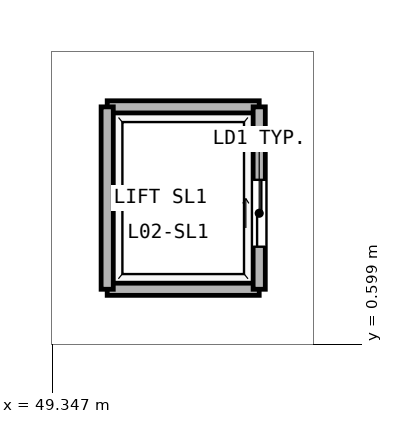
"""IFC4 building model, lengths in metres.
Left out: names, types, materials, properties, quantities, classifications, styles, units other than length and angle.
Written with IfcOpenShell. Run it as: python <this file> out.ifc"""

import sys

from ifc_helpers import new_model, si_unit, direction, frame, frame_2d, origin, place, context, subcontext, project, spatial, rectangle, extrude, element, fill, save


model = new_model("IFC4")
c1 = context("Model", 3, precision=1e-05, world=origin(), true_north=direction((0.0, 1.0)))
c2 = subcontext(c1, "Body", "Model", "MODEL_VIEW")
j1 = project(units=[si_unit("LENGTHUNIT", "METRE"), si_unit("PLANEANGLEUNIT", "RADIAN")], contexts=[c1])
p1 = place(None, origin())
s1 = spatial("IfcSite", under=j1, at=p1, CompositionType="ELEMENT")
p2 = place(p1, origin())
s2 = spatial("IfcBuilding", under=s1, at=p2, CompositionType="ELEMENT")
p3 = place(p2, frame((0.0, 0.0, 9.0)))
s3 = spatial("IfcBuildingStorey", under=s2, at=p3, CompositionType="ELEMENT", Elevation=9.0)
for number, where, z_axis, x_axis in (
    (1, (50.25, 1.5, 0.0), (0.0, 0.0, 1.0), (1.0, 0.0, 0.0)),
    (2, (50.25, 4.5, 0.0), (0.0, 0.0, 1.0), (1.0, 0.0, 0.0)),
):
    element("IfcWall", number, at=place(p3, frame(where, z_axis=z_axis, x_axis=x_axis)), inside=s3, PredefinedType="PARTITIONING", context=c2, shape_type="SweptSolid", body=[
        extrude(rectangle(XDim=2.5, YDim=0.2, at=frame_2d((1.25, 0.0))), origin(), (0.0, 0.0, 1.0), 4.18),
    ])
p4 = place(p3, frame((50.25, 1.5, 0.0), z_axis=(0.0, 0.0, 1.0), x_axis=(0.0, 1.0, 0.0)))
e3 = element("IfcWall", 3, at=p4, inside=s3, PredefinedType="PARTITIONING", context=c2, shape_type="SweptSolid", body=[
    extrude(rectangle(XDim=3.0, YDim=0.2, at=frame_2d((1.5, 0.0))), origin(), (0.0, 0.0, 1.0), 4.18),
])
p5 = place(p3, frame((52.75, 1.5, 0.0), z_axis=(0.0, 0.0, 1.0), x_axis=(0.0, 1.0, 0.0)))
e4 = element("IfcWall", 4, at=p5, inside=s3, PredefinedType="PARTITIONING", context=c2, shape_type="SweptSolid", body=[
    extrude(rectangle(XDim=3.0, YDim=0.2, at=frame_2d((1.5, 0.0))), origin(), (0.0, 0.0, 1.0), 4.18),
])
p6 = place(p5, frame((0.7, 0.0, 0.0)))
e5 = element("IfcOpeningElement", 5, at=p6, cuts=e4, PredefinedType="OPENING", context=c2, shape_type="SweptSolid", body=[
    extrude(rectangle(XDim=1.1, YDim=2.25, at=frame_2d((0.55, 1.125))), frame((0.0, 0.11, 0.0), z_axis=(0.0, -1.0, 0.0), x_axis=(1.0, 0.0, 0.0)), (0.0, 0.0, 1.0), 0.22),
])
p7 = place(p6, origin())
e6 = element("IfcDoor", 6, at=p7, inside=s3, OperationType="DOUBLE_DOOR_SLIDING", PredefinedType="DOOR", context=c2, shape_type="SweptSolid", body=[
    extrude(rectangle(XDim=1.1, YDim=2.25, at=frame_2d((0.55, 1.125))), frame((0.0, 0.025, 0.0), z_axis=(0.0, -1.0, 0.0), x_axis=(1.0, 0.0, 0.0)), (0.0, 0.0, 1.0), 0.05),
])
fill(e5, e6)
save(model, sys.argv[1])
